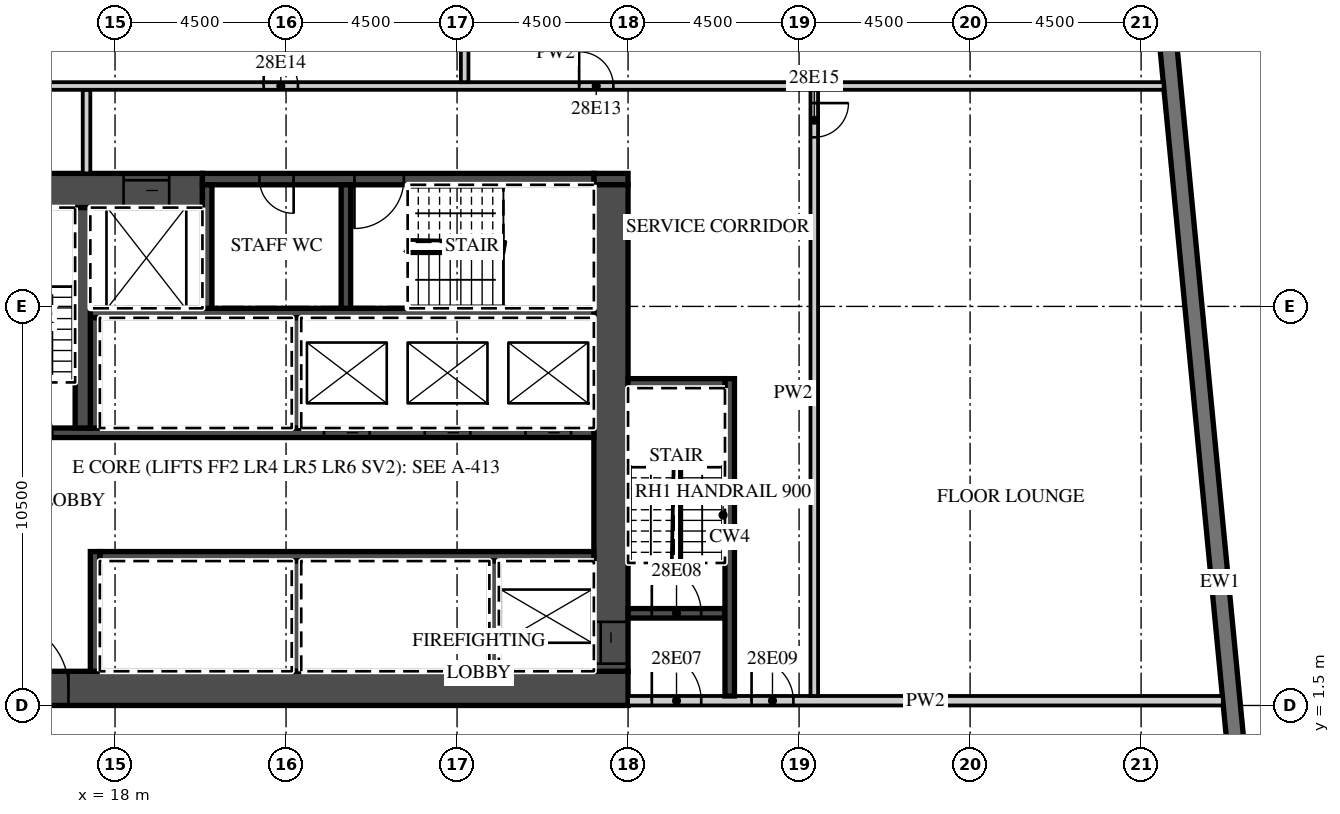
"""IFC4 building model, lengths in metres.
Left out: names, types, materials, properties, quantities, classifications, styles, units other than length and angle.
Written with IfcOpenShell. Run it as: python <this file> out.ifc"""

import sys

from ifc_helpers import new_model, si_unit, direction, frame, frame_2d, origin, place, context, subcontext, project, spatial, rectangle, extrude, element, fill, save


model = new_model("IFC4")
c1 = context("Model", 3, precision=1e-05, world=origin(), true_north=direction((0.0, 1.0)))
c2 = subcontext(c1, "Body", "Model", "MODEL_VIEW")
j1 = project(units=[si_unit("LENGTHUNIT", "METRE"), si_unit("PLANEANGLEUNIT", "RADIAN")], contexts=[c1])
p1 = place(None, origin())
s1 = spatial("IfcSite", under=j1, at=p1, CompositionType="ELEMENT")
p2 = place(p1, origin())
s2 = spatial("IfcBuilding", under=s1, at=p2, CompositionType="ELEMENT")
p3 = place(p2, frame((0.0, 0.0, 127.3)))
s3 = spatial("IfcBuildingStorey", under=s2, at=p3, CompositionType="ELEMENT", Elevation=127.3)
p4 = place(p3, frame((48.753, -12.672, 0.0), z_axis=(0.0, 0.0, 1.0), x_axis=(-0.095842661909, 0.995396495954, 0.0)))
e1 = element("IfcWall", 1, at=p4, inside=s3, PredefinedType="SOLIDWALL", context=c2, shape_type="SweptSolid", body=[
    extrude(rectangle(XDim=35.0, YDim=0.45, at=frame_2d((17.5, 0.0))), origin(), (0.0, 0.0, 1.0), 3.02),
])
p5 = place(p4, frame((3.072, 0.0, 0.45)))
e2 = element("IfcOpeningElement", 2, at=p5, cuts=e1, PredefinedType="OPENING", context=c2, shape_type="SweptSolid", body=[
    extrude(rectangle(XDim=3.3, YDim=2.25, at=frame_2d((1.65, 1.125))), frame((0.0, 0.235, 0.0), z_axis=(0.0, -1.0, 0.0), x_axis=(1.0, 0.0, 0.0)), (0.0, 0.0, 1.0), 0.47),
])
p6 = place(p4, frame((7.593, 0.0, 0.45)))
e3 = element("IfcOpeningElement", 3, at=p6, cuts=e1, PredefinedType="OPENING", context=c2, shape_type="SweptSolid", body=[
    extrude(rectangle(XDim=3.3, YDim=2.25, at=frame_2d((1.65, 1.125))), frame((0.0, 0.235, 0.0), z_axis=(0.0, -1.0, 0.0), x_axis=(1.0, 0.0, 0.0)), (0.0, 0.0, 1.0), 0.47),
])
p7 = place(p3, frame((13.5, 1.95, 0.0), z_axis=(0.0, 0.0, 1.0), x_axis=(1.0, 0.0, 0.0)))
e4 = element("IfcWall", 4, at=p7, inside=s3, PredefinedType="SHEAR", context=c2, shape_type="SweptSolid", body=[
    extrude(rectangle(XDim=18.0, YDim=0.9, at=frame_2d((9.0, 0.0))), origin(), (0.0, 0.0, 1.0), 3.02),
])
p8 = place(p7, frame((1.475, 0.0, 0.0)))
e5 = element("IfcOpeningElement", 5, at=p8, cuts=e4, PredefinedType="OPENING", context=c2, shape_type="SweptSolid", body=[
    extrude(rectangle(XDim=1.8, YDim=2.1, at=frame_2d((0.9, 1.05))), frame((0.0, 0.46, 0.0), z_axis=(0.0, -1.0, 0.0), x_axis=(1.0, 0.0, 0.0)), (0.0, 0.0, 1.0), 0.92),
])
p9 = place(p3, frame((13.5, 15.05, 0.0), z_axis=(0.0, 0.0, 1.0), x_axis=(1.0, 0.0, 0.0)))
e6 = element("IfcWall", 6, at=p9, inside=s3, PredefinedType="SHEAR", context=c2, shape_type="SweptSolid", body=[
    extrude(rectangle(XDim=6.8, YDim=0.9, at=frame_2d((3.4, 0.0))), origin(), (0.0, 0.0, 1.0), 3.02),
])
p10 = place(p9, frame((4.725, 0.0, 0.0)))
e7 = element("IfcOpeningElement", 7, at=p10, cuts=e6, PredefinedType="OPENING", context=c2, shape_type="SweptSolid", body=[
    extrude(rectangle(XDim=1.2, YDim=2.1, at=frame_2d((0.6, 1.05))), frame((0.0, 0.46, 0.0), z_axis=(0.0, -1.0, 0.0), x_axis=(1.0, 0.0, 0.0)), (0.0, 0.0, 1.0), 0.92),
])
p11 = place(p3, frame((30.6, 15.35, 0.0), z_axis=(0.0, 0.0, 1.0), x_axis=(1.0, 0.0, 0.0)))
e8 = element("IfcWall", 8, at=p11, inside=s3, PredefinedType="SHEAR", context=c2, shape_type="SweptSolid", body=[
    extrude(rectangle(XDim=0.9, YDim=0.3, at=frame_2d((0.45, 0.0))), origin(), (0.0, 0.0, 1.0), 3.02),
])
p12 = place(p3, frame((20.3, 15.35, 0.0), z_axis=(0.0, 0.0, 1.0), x_axis=(1.0, 0.0, 0.0)))
e9 = element("IfcWall", 9, at=p12, inside=s3, PredefinedType="SHEAR", context=c2, shape_type="SweptSolid", body=[
    extrude(rectangle(XDim=10.3, YDim=0.3, at=frame_2d((5.15, 0.0))), origin(), (0.0, 0.0, 1.0), 3.02),
])
p13 = place(p12, frame((4.0, 0.0, 0.0)))
e10 = element("IfcOpeningElement", 10, at=p13, cuts=e9, PredefinedType="OPENING", context=c2, shape_type="SweptSolid", body=[
    extrude(rectangle(XDim=1.3, YDim=2.1, at=frame_2d((0.65, 1.05))), frame((0.0, 0.16, 0.0), z_axis=(0.0, -1.0, 0.0), x_axis=(1.0, 0.0, 0.0)), (0.0, 0.0, 1.0), 0.32),
])
p14 = place(p12, frame((1.5, 0.0, 0.0)))
e11 = element("IfcOpeningElement", 11, at=p14, cuts=e9, PredefinedType="OPENING", context=c2, shape_type="SweptSolid", body=[
    extrude(rectangle(XDim=0.9, YDim=2.1, at=frame_2d((0.45, 1.05))), frame((0.0, 0.16, 0.0), z_axis=(0.0, -1.0, 0.0), x_axis=(1.0, 0.0, 0.0)), (0.0, 0.0, 1.0), 0.32),
])
p15 = place(p3, frame((31.05, 2.4, 0.0), z_axis=(0.0, 0.0, 1.0), x_axis=(0.0, 1.0, 0.0)))
e12 = element("IfcWall", 12, at=p15, inside=s3, PredefinedType="SHEAR", context=c2, shape_type="SweptSolid", body=[
    extrude(rectangle(XDim=12.8, YDim=0.9, at=frame_2d((6.4, 0.0))), origin(), (0.0, 0.0, 1.0), 3.02),
])
p16 = place(p15, frame((0.2, 0.0, 0.0)))
e13 = element("IfcOpeningElement", 13, at=p16, cuts=e12, PredefinedType="OPENING", context=c2, shape_type="SweptSolid", body=[
    extrude(rectangle(XDim=1.1, YDim=2.1, at=frame_2d((0.55, 1.05))), frame((0.0, 0.46, 0.0), z_axis=(0.0, -1.0, 0.0), x_axis=(1.0, 0.0, 0.0)), (0.0, 0.0, 1.0), 0.92),
])
p17 = place(p3, frame((17.6, 5.425, 0.0), z_axis=(0.0, 0.0, 1.0), x_axis=(1.0, 0.0, 0.0)))
e14 = element("IfcWall", 14, at=p17, inside=s3, PredefinedType="SHEAR", context=c2, shape_type="SweptSolid", body=[
    extrude(rectangle(XDim=13.0, YDim=0.25, at=frame_2d((6.5, 0.0))), origin(), (0.0, 0.0, 1.0), 3.02),
])
p18 = place(p3, frame((17.475, 2.4, 0.0), z_axis=(0.0, 0.0, 1.0), x_axis=(0.0, 1.0, 0.0)))
e15 = element("IfcWall", 15, at=p18, inside=s3, PredefinedType="SHEAR", context=c2, shape_type="SweptSolid", body=[
    extrude(rectangle(XDim=3.15, YDim=0.25, at=frame_2d((1.575, 0.0))), origin(), (0.0, 0.0, 1.0), 3.02),
])
for number, where, z_axis, x_axis in (
    (16, (27.975, 2.4, 0.0), (0.0, 0.0, 1.0), (0.0, 1.0, 0.0)),
    (17, (22.775, 2.4, 0.0), (0.0, 0.0, 1.0), (0.0, 1.0, 0.0)),
):
    element("IfcWall", number, at=place(p3, frame(where, z_axis=z_axis, x_axis=x_axis)), inside=s3, PredefinedType="SHEAR", context=c2, shape_type="SweptSolid", body=[
        extrude(rectangle(XDim=2.9, YDim=0.25, at=frame_2d((1.45, 0.0))), origin(), (0.0, 0.0, 1.0), 3.02),
    ])
p19 = place(p3, frame((14.4, 8.675, 0.0), z_axis=(0.0, 0.0, 1.0), x_axis=(1.0, 0.0, 0.0)))
e18 = element("IfcWall", 18, at=p19, inside=s3, PredefinedType="SHEAR", context=c2, shape_type="SweptSolid", body=[
    extrude(rectangle(XDim=16.2, YDim=0.25, at=frame_2d((8.1, 0.0))), origin(), (0.0, 0.0, 1.0), 3.02),
])
p20 = place(p19, frame((14.4, 0.0, 0.0)))
e19 = element("IfcOpeningElement", 19, at=p20, cuts=e18, PredefinedType="OPENING", context=c2, shape_type="SweptSolid", body=[
    extrude(rectangle(XDim=1.2, YDim=2.1, at=frame_2d((0.6, 1.05))), frame((0.0, 0.135, 0.0), z_axis=(0.0, -1.0, 0.0), x_axis=(1.0, 0.0, 0.0)), (0.0, 0.0, 1.0), 0.27),
])
p21 = place(p19, frame((11.75, 0.0, 0.0)))
e20 = element("IfcOpeningElement", 20, at=p21, cuts=e18, PredefinedType="OPENING", context=c2, shape_type="SweptSolid", body=[
    extrude(rectangle(XDim=1.2, YDim=2.1, at=frame_2d((0.6, 1.05))), frame((0.0, 0.135, 0.0), z_axis=(0.0, -1.0, 0.0), x_axis=(1.0, 0.0, 0.0)), (0.0, 0.0, 1.0), 0.27),
])
p22 = place(p19, frame((9.1, 0.0, 0.0)))
e21 = element("IfcOpeningElement", 21, at=p22, cuts=e18, PredefinedType="OPENING", context=c2, shape_type="SweptSolid", body=[
    extrude(rectangle(XDim=1.2, YDim=2.1, at=frame_2d((0.6, 1.05))), frame((0.0, 0.135, 0.0), z_axis=(0.0, -1.0, 0.0), x_axis=(1.0, 0.0, 0.0)), (0.0, 0.0, 1.0), 0.27),
])
p23 = place(p19, frame((0.65, 0.0, 0.0)))
e22 = element("IfcOpeningElement", 22, at=p23, cuts=e18, PredefinedType="OPENING", context=c2, shape_type="SweptSolid", body=[
    extrude(rectangle(XDim=1.3, YDim=2.1, at=frame_2d((0.65, 1.05))), frame((0.0, 0.135, 0.0), z_axis=(0.0, -1.0, 0.0), x_axis=(1.0, 0.0, 0.0)), (0.0, 0.0, 1.0), 0.27),
])
p24 = place(p3, frame((17.35, 11.825, 0.0), z_axis=(0.0, 0.0, 1.0), x_axis=(1.0, 0.0, 0.0)))
e23 = element("IfcWall", 23, at=p24, inside=s3, PredefinedType="SHEAR", context=c2, shape_type="SweptSolid", body=[
    extrude(rectangle(XDim=13.25, YDim=0.25, at=frame_2d((6.625, 0.0))), origin(), (0.0, 0.0, 1.0), 3.02),
])
for number, where, z_axis, x_axis in (
    (24, (17.475, 8.8, 0.0), (0.0, 0.0, 1.0), (0.0, 1.0, 0.0)),
    (25, (22.775, 8.8, 0.0), (0.0, 0.0, 1.0), (0.0, 1.0, 0.0)),
):
    element("IfcWall", number, at=place(p3, frame(where, z_axis=z_axis, x_axis=x_axis)), inside=s3, PredefinedType="SHEAR", context=c2, shape_type="SweptSolid", body=[
        extrude(rectangle(XDim=2.9, YDim=0.25, at=frame_2d((1.45, 0.0))), origin(), (0.0, 0.0, 1.0), 3.02),
    ])
p25 = place(p3, frame((17.15, 8.8, 0.0), z_axis=(0.0, 0.0, 1.0), x_axis=(0.0, 1.0, 0.0)))
e26 = element("IfcWall", 26, at=p25, inside=s3, PredefinedType="SHEAR", context=c2, shape_type="SweptSolid", body=[
    extrude(rectangle(XDim=5.8, YDim=0.4, at=frame_2d((2.9, 0.0))), origin(), (0.0, 0.0, 1.0), 3.02),
])
for number, where, z_axis, x_axis in (
    (27, (20.425, 11.95, 0.0), (0.0, 0.0, 1.0), (0.0, 1.0, 0.0)),
    (28, (24.075, 11.95, 0.0), (0.0, 0.0, 1.0), (0.0, 1.0, 0.0)),
):
    element("IfcWall", number, at=place(p3, frame(where, z_axis=z_axis, x_axis=x_axis)), inside=s3, PredefinedType="SHEAR", context=c2, shape_type="SweptSolid", body=[
        extrude(rectangle(XDim=3.25, YDim=0.25, at=frame_2d((1.625, 0.0))), origin(), (0.0, 0.0, 1.0), 3.02),
    ])
p26 = place(p3, frame((31.5, 1.625, 0.0), z_axis=(0.0, 0.0, 1.0), x_axis=(1.0, 0.0, 0.0)))
e29 = element("IfcWall", 29, at=p26, inside=s3, PredefinedType="PARTITIONING", context=c2, shape_type="SweptSolid", body=[
    extrude(rectangle(XDim=15.65, YDim=0.25, at=frame_2d((7.825, 0.0))), origin(), (0.0, 0.0, 1.0), 3.02),
])
p27 = place(p26, frame((0.625, 0.0, 0.0)))
e30 = element("IfcOpeningElement", 30, at=p27, cuts=e29, PredefinedType="OPENING", context=c2, shape_type="SweptSolid", body=[
    extrude(rectangle(XDim=1.3, YDim=2.1, at=frame_2d((0.65, 1.05))), frame((0.0, 0.135, 0.0), z_axis=(0.0, -1.0, 0.0), x_axis=(1.0, 0.0, 0.0)), (0.0, 0.0, 1.0), 0.27),
])
p28 = place(p26, frame((3.25, 0.0, 0.0)))
e31 = element("IfcOpeningElement", 31, at=p28, cuts=e29, PredefinedType="OPENING", context=c2, shape_type="SweptSolid", body=[
    extrude(rectangle(XDim=1.1, YDim=2.1, at=frame_2d((0.55, 1.05))), frame((0.0, 0.135, 0.0), z_axis=(0.0, -1.0, 0.0), x_axis=(1.0, 0.0, 0.0)), (0.0, 0.0, 1.0), 0.27),
])
p29 = place(p3, frame((31.5, 3.925, 0.0), z_axis=(0.0, 0.0, 1.0), x_axis=(1.0, 0.0, 0.0)))
e32 = element("IfcWall", 32, at=p29, inside=s3, PredefinedType="SHEAR", context=c2, shape_type="SweptSolid", body=[
    extrude(rectangle(XDim=2.55, YDim=0.25, at=frame_2d((1.275, 0.0))), origin(), (0.0, 0.0, 1.0), 3.02),
])
p30 = place(p29, frame((0.625, 0.0, 0.0)))
e33 = element("IfcOpeningElement", 33, at=p30, cuts=e32, PredefinedType="OPENING", context=c2, shape_type="SweptSolid", body=[
    extrude(rectangle(XDim=1.3, YDim=2.1, at=frame_2d((0.65, 1.05))), frame((0.0, 0.135, 0.0), z_axis=(0.0, -1.0, 0.0), x_axis=(1.0, 0.0, 0.0)), (0.0, 0.0, 1.0), 0.27),
])
p31 = place(p3, frame((34.175, 1.75, 0.0), z_axis=(0.0, 0.0, 1.0), x_axis=(0.0, 1.0, 0.0)))
e34 = element("IfcWall", 34, at=p31, inside=s3, PredefinedType="SHEAR", context=c2, shape_type="SweptSolid", body=[
    extrude(rectangle(XDim=8.35, YDim=0.25, at=frame_2d((4.175, 0.0))), origin(), (0.0, 0.0, 1.0), 3.02),
])
p32 = place(p3, frame((31.5, 9.975, 0.0), z_axis=(0.0, 0.0, 1.0), x_axis=(1.0, 0.0, 0.0)))
e35 = element("IfcWall", 35, at=p32, inside=s3, PredefinedType="SHEAR", context=c2, shape_type="SweptSolid", body=[
    extrude(rectangle(XDim=2.55, YDim=0.25, at=frame_2d((1.275, 0.0))), origin(), (0.0, 0.0, 1.0), 3.02),
])
p33 = place(p3, frame((17.25, 15.5, 0.0), z_axis=(0.0, 0.0, 1.0), x_axis=(0.0, 1.0, 0.0)))
e36 = element("IfcWall", 36, at=p33, inside=s3, PredefinedType="PARTITIONING", context=c2, shape_type="SweptSolid", body=[
    extrude(rectangle(XDim=2.2, YDim=0.2, at=frame_2d((1.1, 0.0))), origin(), (0.0, 0.0, 1.0), 3.02),
])
p34 = place(p3, frame((36.4, 1.75, 0.0), z_axis=(0.0, 0.0, 1.0), x_axis=(0.0, 1.0, 0.0)))
e37 = element("IfcWall", 37, at=p34, inside=s3, PredefinedType="PARTITIONING", context=c2, shape_type="SweptSolid", body=[
    extrude(rectangle(XDim=15.95, YDim=0.2, at=frame_2d((7.975, 0.0))), origin(), (0.0, 0.0, 1.0), 3.02),
])
p35 = place(p34, frame((14.7, 0.0, 0.0)))
e38 = element("IfcOpeningElement", 38, at=p35, cuts=e37, PredefinedType="OPENING", context=c2, shape_type="SweptSolid", body=[
    extrude(rectangle(XDim=0.9, YDim=2.1, at=frame_2d((0.45, 1.05))), frame((0.0, 0.11, 0.0), z_axis=(0.0, -1.0, 0.0), x_axis=(1.0, 0.0, 0.0)), (0.0, 0.0, 1.0), 0.22),
])
p36 = place(p3, frame((13.6, 17.8, 0.0), z_axis=(0.0, 0.0, 1.0), x_axis=(1.0, 0.0, 0.0)))
e39 = element("IfcWall", 39, at=p36, inside=s3, PredefinedType="PARTITIONING", context=c2, shape_type="SweptSolid", body=[
    extrude(rectangle(XDim=31.993, YDim=0.2, at=frame_2d((15.997, 0.0))), origin(), (0.0, 0.0, 1.0), 3.02),
])
p37 = place(p36, frame((16.613, 0.0, 0.0)))
e40 = element("IfcOpeningElement", 40, at=p37, cuts=e39, PredefinedType="OPENING", context=c2, shape_type="SweptSolid", body=[
    extrude(rectangle(XDim=0.9, YDim=2.1, at=frame_2d((0.45, 1.05))), frame((0.0, 0.11, 0.0), z_axis=(0.0, -1.0, 0.0), x_axis=(1.0, 0.0, 0.0)), (0.0, 0.0, 1.0), 0.22),
])
p38 = place(p36, frame((8.312, 0.0, 0.0)))
e41 = element("IfcOpeningElement", 41, at=p38, cuts=e39, PredefinedType="OPENING", context=c2, shape_type="SweptSolid", body=[
    extrude(rectangle(XDim=0.9, YDim=2.1, at=frame_2d((0.45, 1.05))), frame((0.0, 0.11, 0.0), z_axis=(0.0, -1.0, 0.0), x_axis=(1.0, 0.0, 0.0)), (0.0, 0.0, 1.0), 0.22),
])
p39 = place(p3, frame((27.2, 17.9, 0.0), z_axis=(0.0, 0.0, 1.0), x_axis=(0.0, 1.0, 0.0)))
e42 = element("IfcWall", 42, at=p39, inside=s3, PredefinedType="PARTITIONING", context=c2, shape_type="SweptSolid", body=[
    extrude(rectangle(XDim=6.082, YDim=0.2, at=frame_2d((3.041, 0.0))), origin(), (0.0, 0.0, 1.0), 3.02),
])
p40 = place(p20, origin())
e43 = element("IfcDoor", 43, at=p40, inside=s3, OperationType="SLIDING_TO_LEFT", PredefinedType="DOOR", context=c2, shape_type="SweptSolid", body=[
    extrude(rectangle(XDim=1.2, YDim=2.1, at=frame_2d((0.6, 1.05))), frame((0.0, 0.025, 0.0), z_axis=(0.0, -1.0, 0.0), x_axis=(1.0, 0.0, 0.0)), (0.0, 0.0, 1.0), 0.05),
])
fill(e19, e43)
p41 = place(p21, origin())
e44 = element("IfcDoor", 44, at=p41, inside=s3, OperationType="SLIDING_TO_RIGHT", PredefinedType="DOOR", context=c2, shape_type="SweptSolid", body=[
    extrude(rectangle(XDim=1.2, YDim=2.1, at=frame_2d((0.6, 1.05))), frame((0.0, 0.025, 0.0), z_axis=(0.0, -1.0, 0.0), x_axis=(1.0, 0.0, 0.0)), (0.0, 0.0, 1.0), 0.05),
])
fill(e20, e44)
p42 = place(p22, origin())
e45 = element("IfcDoor", 45, at=p42, inside=s3, OperationType="SLIDING_TO_RIGHT", PredefinedType="DOOR", context=c2, shape_type="SweptSolid", body=[
    extrude(rectangle(XDim=1.2, YDim=2.1, at=frame_2d((0.6, 1.05))), frame((0.0, 0.025, 0.0), z_axis=(0.0, -1.0, 0.0), x_axis=(1.0, 0.0, 0.0)), (0.0, 0.0, 1.0), 0.05),
])
fill(e21, e45)
p43 = place(p10, origin())
e46 = element("IfcDoor", 46, at=p43, inside=s3, OperationType="SLIDING_TO_LEFT", PredefinedType="DOOR", context=c2, shape_type="SweptSolid", body=[
    extrude(rectangle(XDim=1.2, YDim=2.1, at=frame_2d((0.6, 1.05))), frame((0.0, 0.025, 0.0), z_axis=(0.0, -1.0, 0.0), x_axis=(1.0, 0.0, 0.0)), (0.0, 0.0, 1.0), 0.05),
])
fill(e7, e46)
p44 = place(p16, origin())
e47 = element("IfcDoor", 47, at=p44, inside=s3, OperationType="SLIDING_TO_LEFT", PredefinedType="DOOR", context=c2, shape_type="SweptSolid", body=[
    extrude(rectangle(XDim=1.1, YDim=2.1, at=frame_2d((0.55, 1.05))), frame((0.0, 0.025, 0.0), z_axis=(0.0, -1.0, 0.0), x_axis=(1.0, 0.0, 0.0)), (0.0, 0.0, 1.0), 0.05),
])
fill(e13, e47)
p45 = place(p8, origin())
e48 = element("IfcDoor", 48, at=p45, inside=s3, OperationType="DOUBLE_DOOR_DOUBLE_SWING", PredefinedType="DOOR", context=c2, shape_type="SweptSolid", body=[
    extrude(rectangle(XDim=1.8, YDim=2.1, at=frame_2d((0.9, 1.05))), frame((0.0, 0.025, 0.0), z_axis=(0.0, -1.0, 0.0), x_axis=(1.0, 0.0, 0.0)), (0.0, 0.0, 1.0), 0.05),
])
fill(e5, e48)
p46 = place(p27, origin())
e49 = element("IfcDoor", 49, at=p46, inside=s3, OperationType="SINGLE_SWING_LEFT", PredefinedType="DOOR", context=c2, shape_type="SweptSolid", body=[
    extrude(rectangle(XDim=1.3, YDim=2.1, at=frame_2d((0.65, 1.05))), frame((0.0, 0.025, 0.0), z_axis=(0.0, -1.0, 0.0), x_axis=(1.0, 0.0, 0.0)), (0.0, 0.0, 1.0), 0.05),
])
fill(e30, e49)
p47 = place(p30, origin())
e50 = element("IfcDoor", 50, at=p47, inside=s3, OperationType="SINGLE_SWING_LEFT", PredefinedType="DOOR", context=c2, shape_type="SweptSolid", body=[
    extrude(rectangle(XDim=1.3, YDim=2.1, at=frame_2d((0.65, 1.05))), frame((0.0, 0.025, 0.0), z_axis=(0.0, -1.0, 0.0), x_axis=(1.0, 0.0, 0.0)), (0.0, 0.0, 1.0), 0.05),
])
fill(e33, e50)
p48 = place(p28, origin())
e51 = element("IfcDoor", 51, at=p48, inside=s3, OperationType="SINGLE_SWING_LEFT", PredefinedType="DOOR", context=c2, shape_type="SweptSolid", body=[
    extrude(rectangle(XDim=1.1, YDim=2.1, at=frame_2d((0.55, 1.05))), frame((0.0, 0.025, 0.0), z_axis=(0.0, -1.0, 0.0), x_axis=(1.0, 0.0, 0.0)), (0.0, 0.0, 1.0), 0.05),
])
fill(e31, e51)
p49 = place(p13, origin())
e52 = element("IfcDoor", 52, at=p49, inside=s3, OperationType="SINGLE_SWING_LEFT", PredefinedType="DOOR", context=c2, shape_type="SweptSolid", body=[
    extrude(rectangle(XDim=1.3, YDim=2.1, at=frame_2d((0.65, 1.05))), frame((0.0, 0.025, 0.0), z_axis=(0.0, -1.0, 0.0), x_axis=(1.0, 0.0, 0.0)), (0.0, 0.0, 1.0), 0.05),
])
fill(e10, e52)
p50 = place(p14, origin())
e53 = element("IfcDoor", 53, at=p50, inside=s3, OperationType="SINGLE_SWING_RIGHT", PredefinedType="DOOR", context=c2, shape_type="SweptSolid", body=[
    extrude(rectangle(XDim=0.9, YDim=2.1, at=frame_2d((0.45, 1.05))), frame((0.0, 0.025, 0.0), z_axis=(0.0, -1.0, 0.0), x_axis=(1.0, 0.0, 0.0)), (0.0, 0.0, 1.0), 0.05),
])
fill(e11, e53)
p51 = place(p37, origin())
e54 = element("IfcDoor", 54, at=p51, inside=s3, OperationType="SINGLE_SWING_LEFT", PredefinedType="DOOR", context=c2, shape_type="SweptSolid", body=[
    extrude(rectangle(XDim=0.9, YDim=2.1, at=frame_2d((0.45, 1.05))), frame((0.0, 0.025, 0.0), z_axis=(0.0, -1.0, 0.0), x_axis=(1.0, 0.0, 0.0)), (0.0, 0.0, 1.0), 0.05),
])
fill(e40, e54)
p52 = place(p38, origin())
e55 = element("IfcDoor", 55, at=p52, inside=s3, OperationType="SINGLE_SWING_LEFT", PredefinedType="DOOR", context=c2, shape_type="SweptSolid", body=[
    extrude(rectangle(XDim=0.9, YDim=2.1, at=frame_2d((0.45, 1.05))), frame((0.0, 0.025, 0.0), z_axis=(0.0, -1.0, 0.0), x_axis=(1.0, 0.0, 0.0)), (0.0, 0.0, 1.0), 0.05),
])
fill(e41, e55)
p53 = place(p35, origin())
e56 = element("IfcDoor", 56, at=p53, inside=s3, OperationType="SINGLE_SWING_RIGHT", PredefinedType="DOOR", context=c2, shape_type="SweptSolid", body=[
    extrude(rectangle(XDim=0.9, YDim=2.1, at=frame_2d((0.45, 1.05))), frame((0.0, 0.025, 0.0), z_axis=(0.0, -1.0, 0.0), x_axis=(1.0, 0.0, 0.0)), (0.0, 0.0, 1.0), 0.05),
])
fill(e38, e56)
save(model, sys.argv[1])
